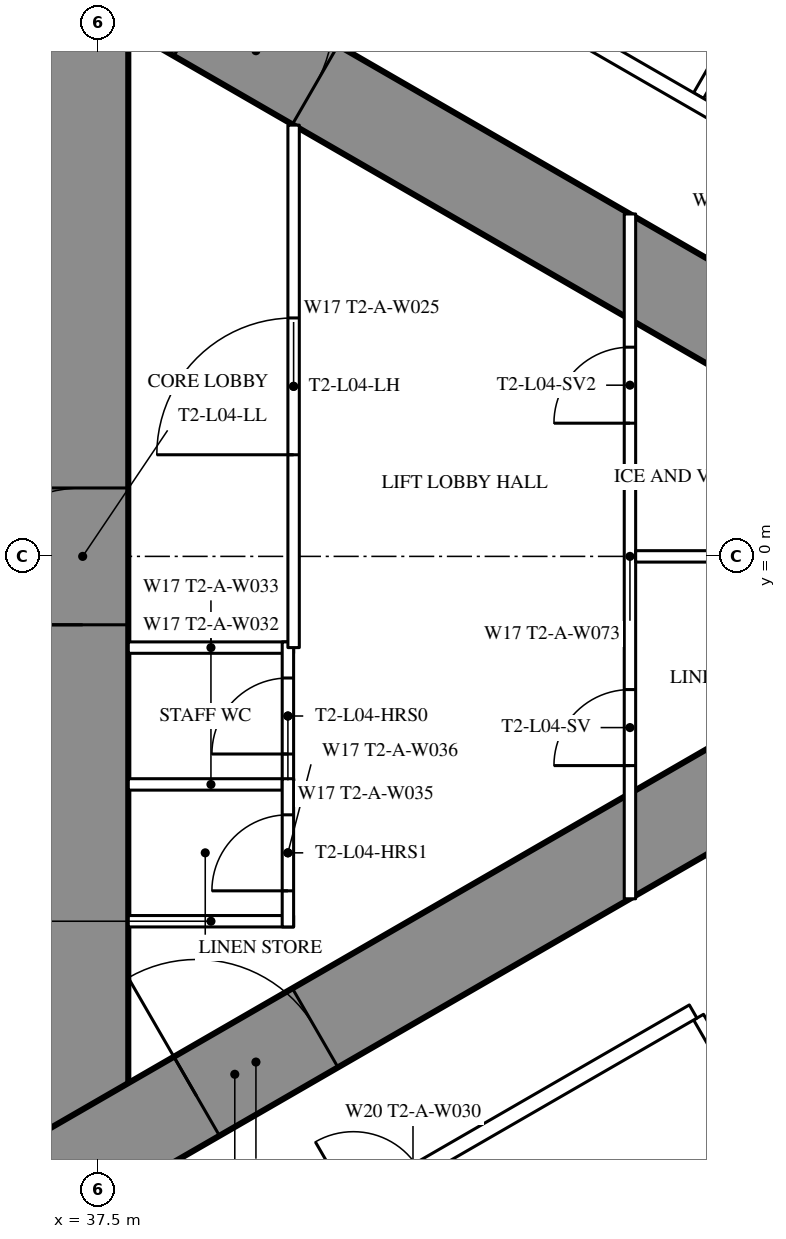
"""IFC4 building model, lengths in metres.
Left out: names, types, materials, properties, quantities, classifications, styles, units other than length and angle.
Written with IfcOpenShell. Run it as: python <this file> out.ifc"""

import sys

from ifc_helpers import new_model, si_unit, direction, frame, frame_2d, origin, place, context, subcontext, project, spatial, rectangle, extrude, element, fill, save


model = new_model("IFC4")
c1 = context("Model", 3, precision=1e-05, world=origin(), true_north=direction((0.0, 1.0)))
c2 = subcontext(c1, "Body", "Model", "MODEL_VIEW")
j1 = project(units=[si_unit("LENGTHUNIT", "METRE"), si_unit("PLANEANGLEUNIT", "RADIAN")], contexts=[c1])
p1 = place(None, origin())
s1 = spatial("IfcSite", under=j1, at=p1, CompositionType="ELEMENT")
p2 = place(p1, origin())
s2 = spatial("IfcBuilding", under=s1, at=p2, CompositionType="ELEMENT")
p3 = place(p2, frame((0.0, 0.0, 21.5)))
s3 = spatial("IfcBuildingStorey", under=s2, at=p3, CompositionType="ELEMENT", Elevation=21.5)
p4 = place(p3, frame((37.3, -8.6, 0.0), z_axis=(0.0, 0.0, 1.0), x_axis=(0.0, 1.0, 0.0)))
e1 = element("IfcWall", 1, at=p4, inside=s3, PredefinedType="SHEAR", context=c2, shape_type="SweptSolid", body=[
    extrude(rectangle(XDim=17.2, YDim=1.2, at=frame_2d((8.6, 0.0))), origin(), (0.0, 0.0, 1.0), 3.5),
])
p5 = place(p4, frame((7.7, 0.0, 0.0)))
e2 = element("IfcOpeningElement", 2, at=p5, cuts=e1, PredefinedType="OPENING", context=c2, shape_type="SweptSolid", body=[
    extrude(rectangle(XDim=1.8, YDim=2.2, at=frame_2d((0.9, 1.1))), frame((0.0, 0.61, 0.0), z_axis=(0.0, -1.0, 0.0), x_axis=(1.0, 0.0, 0.0)), (0.0, 0.0, 1.0), 1.22),
])
p6 = place(p3, frame((27.2, -13.8, 0.0), z_axis=(0.0, 0.0, 1.0), x_axis=(0.866027159892, 0.499996958321, 0.0)))
e3 = element("IfcWall", 3, at=p6, inside=s3, PredefinedType="SHEAR", context=c2, shape_type="SweptSolid", body=[
    extrude(rectangle(XDim=27.947, YDim=1.2, at=frame_2d((13.973, 0.0))), origin(), (0.0, 0.0, 1.0), 3.5),
])
p7 = place(p6, frame((4.6, 0.0, 0.0)))
e4 = element("IfcOpeningElement", 4, at=p7, cuts=e3, PredefinedType="OPENING", context=c2, shape_type="SweptSolid", body=[
    extrude(rectangle(XDim=1.0, YDim=2.2, at=frame_2d((0.5, 1.1))), frame((0.0, 0.61, 0.0), z_axis=(0.0, -1.0, 0.0), x_axis=(1.0, 0.0, 0.0)), (0.0, 0.0, 1.0), 1.22),
])
p8 = place(p6, frame((13.395, 0.0, 0.0)))
e5 = element("IfcOpeningElement", 5, at=p8, cuts=e3, PredefinedType="OPENING", context=c2, shape_type="SweptSolid", body=[
    extrude(rectangle(XDim=1.8, YDim=2.2, at=frame_2d((0.9, 1.1))), frame((0.0, 0.61, 0.0), z_axis=(0.0, -1.0, 0.0), x_axis=(1.0, 0.0, 0.0)), (0.0, 0.0, 1.0), 1.22),
])
p9 = place(p3, frame((27.2, 13.8, 0.0), z_axis=(0.0, 0.0, 1.0), x_axis=(0.866024515034, -0.500001539357, 0.0)))
e6 = element("IfcWall", 6, at=p9, inside=s3, PredefinedType="SHEAR", context=c2, shape_type="SweptSolid", body=[
    extrude(rectangle(XDim=26.907, YDim=1.2, at=frame_2d((13.454, 0.0))), origin(), (0.0, 0.0, 1.0), 3.5),
])
p10 = place(p9, frame((4.6, 0.0, 0.0)))
e7 = element("IfcOpeningElement", 7, at=p10, cuts=e6, PredefinedType="OPENING", context=c2, shape_type="SweptSolid", body=[
    extrude(rectangle(XDim=1.0, YDim=2.2, at=frame_2d((0.5, 1.1))), frame((0.0, 0.61, 0.0), z_axis=(0.0, -1.0, 0.0), x_axis=(1.0, 0.0, 0.0)), (0.0, 0.0, 1.0), 1.22),
])
p11 = place(p9, frame((13.395, 0.0, 0.0)))
e8 = element("IfcOpeningElement", 8, at=p11, cuts=e6, PredefinedType="OPENING", context=c2, shape_type="SweptSolid", body=[
    extrude(rectangle(XDim=1.8, YDim=2.2, at=frame_2d((0.9, 1.1))), frame((0.0, 0.61, 0.0), z_axis=(0.0, -1.0, 0.0), x_axis=(1.0, 0.0, 0.0)), (0.0, 0.0, 1.0), 1.22),
])
p12 = place(p3, frame((45.403, -6.062, 0.0), z_axis=(0.0, 0.0, 1.0), x_axis=(0.500007077968, -0.866021317279, 0.0)))
e9 = element("IfcWall", 9, at=p12, inside=s3, PredefinedType="PARTITIONING", context=c2, shape_type="SweptSolid", body=[
    extrude(rectangle(XDim=12.721, YDim=0.15, at=frame_2d((6.361, 0.0))), origin(), (0.0, 0.0, 1.0), 3.25),
])
p13 = place(p3, frame((45.403, 6.062, 0.0), z_axis=(0.0, 0.0, 1.0), x_axis=(0.500013434677, 0.866017647131, 0.0)))
e10 = element("IfcWall", 10, at=p13, inside=s3, PredefinedType="PARTITIONING", context=c2, shape_type="SweptSolid", body=[
    extrude(rectangle(XDim=9.902, YDim=0.15, at=frame_2d((4.951, 0.0))), origin(), (0.0, 0.0, 1.0), 2.25),
])
p14 = place(p3, frame((36.834, 10.894, 0.0), z_axis=(0.0, 0.0, 1.0), x_axis=(0.866028157229, -0.499995230863, 0.0)))
e11 = element("IfcWall", 11, at=p14, inside=s3, PredefinedType="PARTITIONING", context=c2, shape_type="SweptSolid", body=[
    extrude(rectangle(XDim=21.667, YDim=0.2, at=frame_2d((10.833, 0.0))), origin(), (0.0, 0.0, 1.0), 3.25),
])
p15 = place(p14, frame((18.885, 0.0, 0.0)))
e12 = element("IfcOpeningElement", 12, at=p15, cuts=e11, PredefinedType="OPENING", context=c2, shape_type="SweptSolid", body=[
    extrude(rectangle(XDim=0.95, YDim=2.2, at=frame_2d((0.475, 1.1))), frame((0.0, 0.11, 0.0), z_axis=(0.0, -1.0, 0.0), x_axis=(1.0, 0.0, 0.0)), (0.0, 0.0, 1.0), 0.22),
])
p16 = place(p14, frame((14.835, 0.0, 0.0)))
e13 = element("IfcOpeningElement", 13, at=p16, cuts=e11, PredefinedType="OPENING", context=c2, shape_type="SweptSolid", body=[
    extrude(rectangle(XDim=0.95, YDim=2.2, at=frame_2d((0.475, 1.1))), frame((0.0, 0.11, 0.0), z_axis=(0.0, -1.0, 0.0), x_axis=(1.0, 0.0, 0.0)), (0.0, 0.0, 1.0), 0.22),
])
p17 = place(p14, frame((12.85, 0.0, 0.0)))
e14 = element("IfcOpeningElement", 14, at=p17, cuts=e11, PredefinedType="OPENING", context=c2, shape_type="SweptSolid", body=[
    extrude(rectangle(XDim=0.95, YDim=2.2, at=frame_2d((0.475, 1.1))), frame((0.0, 0.11, 0.0), z_axis=(0.0, -1.0, 0.0), x_axis=(1.0, 0.0, 0.0)), (0.0, 0.0, 1.0), 0.22),
])
p18 = place(p14, frame((1.542, 0.0, 0.0)))
e15 = element("IfcOpeningElement", 15, at=p18, cuts=e11, PredefinedType="OPENING", context=c2, shape_type="SweptSolid", body=[
    extrude(rectangle(XDim=0.95, YDim=2.2, at=frame_2d((0.475, 1.1))), frame((0.0, 0.11, 0.0), z_axis=(0.0, -1.0, 0.0), x_axis=(1.0, 0.0, 0.0)), (0.0, 0.0, 1.0), 0.22),
])
p19 = place(p3, frame((37.96, -10.243, 0.0), z_axis=(0.0, 0.0, 1.0), x_axis=(0.866024617314, 0.500001362204, 0.0)))
e16 = element("IfcWall", 16, at=p19, inside=s3, PredefinedType="PARTITIONING", context=c2, shape_type="SweptSolid", body=[
    extrude(rectangle(XDim=8.512, YDim=0.2, at=frame_2d((4.256, 0.0))), origin(), (0.0, 0.0, 1.0), 3.25),
])
p20 = place(p19, frame((3.35, 0.0, 0.0)))
e17 = element("IfcOpeningElement", 17, at=p20, cuts=e16, PredefinedType="OPENING", context=c2, shape_type="SweptSolid", body=[
    extrude(rectangle(XDim=1.0, YDim=2.2, at=frame_2d((0.5, 1.1))), frame((0.0, 0.11, 0.0), z_axis=(0.0, -1.0, 0.0), x_axis=(1.0, 0.0, 0.0)), (0.0, 0.0, 1.0), 0.22),
])
for number, where, z_axis, x_axis in (
    (18, (37.9, -1.2, 0.0), (0.0, 0.0, 1.0), (1.0, 0.0, 0.0)),
    (19, (37.9, -3.0, 0.0), (0.0, 0.0, 1.0), (1.0, 0.0, 0.0)),
    (20, (37.9, -4.8, 0.0), (0.0, 0.0, 1.0), (1.0, 0.0, 0.0)),
):
    element("IfcWall", number, at=place(p3, frame(where, z_axis=z_axis, x_axis=x_axis)), inside=s3, PredefinedType="PARTITIONING", context=c2, shape_type="SweptSolid", body=[
        extrude(rectangle(XDim=2.175, YDim=0.15, at=frame_2d((1.087, 0.0))), origin(), (0.0, 0.0, 1.0), 3.25),
    ])
p21 = place(p3, frame((40.0, -3.075, 0.0), z_axis=(0.0, 0.0, 1.0), x_axis=(0.0, 1.0, 0.0)))
e21 = element("IfcWall", 21, at=p21, inside=s3, PredefinedType="PARTITIONING", context=c2, shape_type="SweptSolid", body=[
    extrude(rectangle(XDim=1.95, YDim=0.15, at=frame_2d((0.975, 0.0))), origin(), (0.0, 0.0, 1.0), 3.25),
])
p22 = place(p21, frame((0.475, 0.0, 0.0)))
e22 = element("IfcOpeningElement", 22, at=p22, cuts=e21, PredefinedType="OPENING", context=c2, shape_type="SweptSolid", body=[
    extrude(rectangle(XDim=1.0, YDim=2.2, at=frame_2d((0.5, 1.1))), frame((0.0, 0.085, 0.0), z_axis=(0.0, -1.0, 0.0), x_axis=(1.0, 0.0, 0.0)), (0.0, 0.0, 1.0), 0.17),
])
p23 = place(p3, frame((40.0, -4.875, 0.0), z_axis=(0.0, 0.0, 1.0), x_axis=(0.0, 1.0, 0.0)))
e23 = element("IfcWall", 23, at=p23, inside=s3, PredefinedType="PARTITIONING", context=c2, shape_type="SweptSolid", body=[
    extrude(rectangle(XDim=1.95, YDim=0.15, at=frame_2d((0.975, 0.0))), origin(), (0.0, 0.0, 1.0), 3.25),
])
p24 = place(p23, frame((0.475, 0.0, 0.0)))
e24 = element("IfcOpeningElement", 24, at=p24, cuts=e23, PredefinedType="OPENING", context=c2, shape_type="SweptSolid", body=[
    extrude(rectangle(XDim=1.0, YDim=2.2, at=frame_2d((0.5, 1.1))), frame((0.0, 0.085, 0.0), z_axis=(0.0, -1.0, 0.0), x_axis=(1.0, 0.0, 0.0)), (0.0, 0.0, 1.0), 0.17),
])
p25 = place(p3, frame((40.075, -1.2, 0.0), z_axis=(0.0, 0.0, 1.0), x_axis=(0.0, 1.0, 0.0)))
e25 = element("IfcWall", 25, at=p25, inside=s3, PredefinedType="PARTITIONING", context=c2, shape_type="SweptSolid", body=[
    extrude(rectangle(XDim=6.874, YDim=0.15, at=frame_2d((3.437, 0.0))), origin(), (0.0, 0.0, 1.0), 3.25),
])
p26 = place(p25, frame((2.537, 0.0, 0.0)))
e26 = element("IfcOpeningElement", 26, at=p26, cuts=e25, PredefinedType="OPENING", context=c2, shape_type="SweptSolid", body=[
    extrude(rectangle(XDim=1.8, YDim=2.2, at=frame_2d((0.9, 1.1))), frame((0.0, 0.085, 0.0), z_axis=(0.0, -1.0, 0.0), x_axis=(1.0, 0.0, 0.0)), (0.0, 0.0, 1.0), 0.17),
])
p27 = place(p3, frame((44.5, -4.505, 0.0), z_axis=(0.0, 0.0, 1.0), x_axis=(0.0, 1.0, 0.0)))
e27 = element("IfcWall", 27, at=p27, inside=s3, PredefinedType="PARTITIONING", context=c2, shape_type="SweptSolid", body=[
    extrude(rectangle(XDim=9.009, YDim=0.15, at=frame_2d((4.505, 0.0))), origin(), (0.0, 0.0, 1.0), 2.45),
])
p28 = place(p27, frame((1.752, 0.0, 0.0)))
e28 = element("IfcOpeningElement", 28, at=p28, cuts=e27, PredefinedType="OPENING", context=c2, shape_type="SweptSolid", body=[
    extrude(rectangle(XDim=1.0, YDim=2.2, at=frame_2d((0.5, 1.1))), frame((0.0, 0.085, 0.0), z_axis=(0.0, -1.0, 0.0), x_axis=(1.0, 0.0, 0.0)), (0.0, 0.0, 1.0), 0.17),
])
p29 = place(p27, frame((6.257, 0.0, 0.0)))
e29 = element("IfcOpeningElement", 29, at=p29, cuts=e27, PredefinedType="OPENING", context=c2, shape_type="SweptSolid", body=[
    extrude(rectangle(XDim=1.0, YDim=2.2, at=frame_2d((0.5, 1.1))), frame((0.0, 0.085, 0.0), z_axis=(0.0, -1.0, 0.0), x_axis=(1.0, 0.0, 0.0)), (0.0, 0.0, 1.0), 0.17),
])
p30 = place(p3, frame((44.575, 0.0, 0.0), z_axis=(0.0, 0.0, 1.0), x_axis=(1.0, 0.0, 0.0)))
e30 = element("IfcWall", 30, at=p30, inside=s3, PredefinedType="PARTITIONING", context=c2, shape_type="SweptSolid", body=[
    extrude(rectangle(XDim=7.727, YDim=0.15, at=frame_2d((3.864, 0.0))), origin(), (0.0, 0.0, 1.0), 2.25),
])
p31 = place(p22, origin())
e31 = element("IfcDoor", 31, at=p31, inside=s3, OperationType="SINGLE_SWING_LEFT", PredefinedType="DOOR", context=c2, shape_type="SweptSolid", body=[
    extrude(rectangle(XDim=1.0, YDim=2.2, at=frame_2d((0.5, 1.1))), frame((0.0, 0.025, 0.0), z_axis=(0.0, -1.0, 0.0), x_axis=(1.0, 0.0, 0.0)), (0.0, 0.0, 1.0), 0.05),
])
fill(e22, e31)
p32 = place(p24, origin())
e32 = element("IfcDoor", 32, at=p32, inside=s3, OperationType="SINGLE_SWING_LEFT", PredefinedType="DOOR", context=c2, shape_type="SweptSolid", body=[
    extrude(rectangle(XDim=1.0, YDim=2.2, at=frame_2d((0.5, 1.1))), frame((0.0, 0.025, 0.0), z_axis=(0.0, -1.0, 0.0), x_axis=(1.0, 0.0, 0.0)), (0.0, 0.0, 1.0), 0.05),
])
fill(e24, e32)
p33 = place(p26, origin())
e33 = element("IfcDoor", 33, at=p33, inside=s3, OperationType="DOUBLE_DOOR_SINGLE_SWING", PredefinedType="DOOR", context=c2, shape_type="SweptSolid", body=[
    extrude(rectangle(XDim=1.8, YDim=2.2, at=frame_2d((0.9, 1.1))), frame((0.0, 0.025, 0.0), z_axis=(0.0, -1.0, 0.0), x_axis=(1.0, 0.0, 0.0)), (0.0, 0.0, 1.0), 0.05),
])
fill(e26, e33)
p34 = place(p28, origin())
e34 = element("IfcDoor", 34, at=p34, inside=s3, OperationType="SINGLE_SWING_LEFT", PredefinedType="DOOR", context=c2, shape_type="SweptSolid", body=[
    extrude(rectangle(XDim=1.0, YDim=2.2, at=frame_2d((0.5, 1.1))), frame((0.0, 0.025, 0.0), z_axis=(0.0, -1.0, 0.0), x_axis=(1.0, 0.0, 0.0)), (0.0, 0.0, 1.0), 0.05),
])
fill(e28, e34)
p35 = place(p29, origin())
e35 = element("IfcDoor", 35, at=p35, inside=s3, OperationType="SINGLE_SWING_LEFT", PredefinedType="DOOR", context=c2, shape_type="SweptSolid", body=[
    extrude(rectangle(XDim=1.0, YDim=2.2, at=frame_2d((0.5, 1.1))), frame((0.0, 0.025, 0.0), z_axis=(0.0, -1.0, 0.0), x_axis=(1.0, 0.0, 0.0)), (0.0, 0.0, 1.0), 0.05),
])
fill(e29, e35)
p36 = place(p8, origin())
e36 = element("IfcDoor", 36, at=p36, inside=s3, OperationType="DOUBLE_DOOR_SINGLE_SWING", PredefinedType="DOOR", context=c2, shape_type="SweptSolid", body=[
    extrude(rectangle(XDim=1.8, YDim=2.2, at=frame_2d((0.9, 1.1))), frame((0.0, 0.025, 0.0), z_axis=(0.0, -1.0, 0.0), x_axis=(1.0, 0.0, 0.0)), (0.0, 0.0, 1.0), 0.05),
])
fill(e5, e36)
p37 = place(p11, origin())
e37 = element("IfcDoor", 37, at=p37, inside=s3, OperationType="DOUBLE_DOOR_SINGLE_SWING", PredefinedType="DOOR", context=c2, shape_type="SweptSolid", body=[
    extrude(rectangle(XDim=1.8, YDim=2.2, at=frame_2d((0.9, 1.1))), frame((0.0, 0.025, 0.0), z_axis=(0.0, -1.0, 0.0), x_axis=(1.0, 0.0, 0.0)), (0.0, 0.0, 1.0), 0.05),
])
fill(e8, e37)
p38 = place(p5, origin())
e38 = element("IfcDoor", 38, at=p38, inside=s3, OperationType="DOUBLE_DOOR_SINGLE_SWING", PredefinedType="DOOR", context=c2, shape_type="SweptSolid", body=[
    extrude(rectangle(XDim=1.8, YDim=2.2, at=frame_2d((0.9, 1.1))), frame((0.0, 0.025, 0.0), z_axis=(0.0, -1.0, 0.0), x_axis=(1.0, 0.0, 0.0)), (0.0, 0.0, 1.0), 0.05),
])
fill(e2, e38)
save(model, sys.argv[1])
